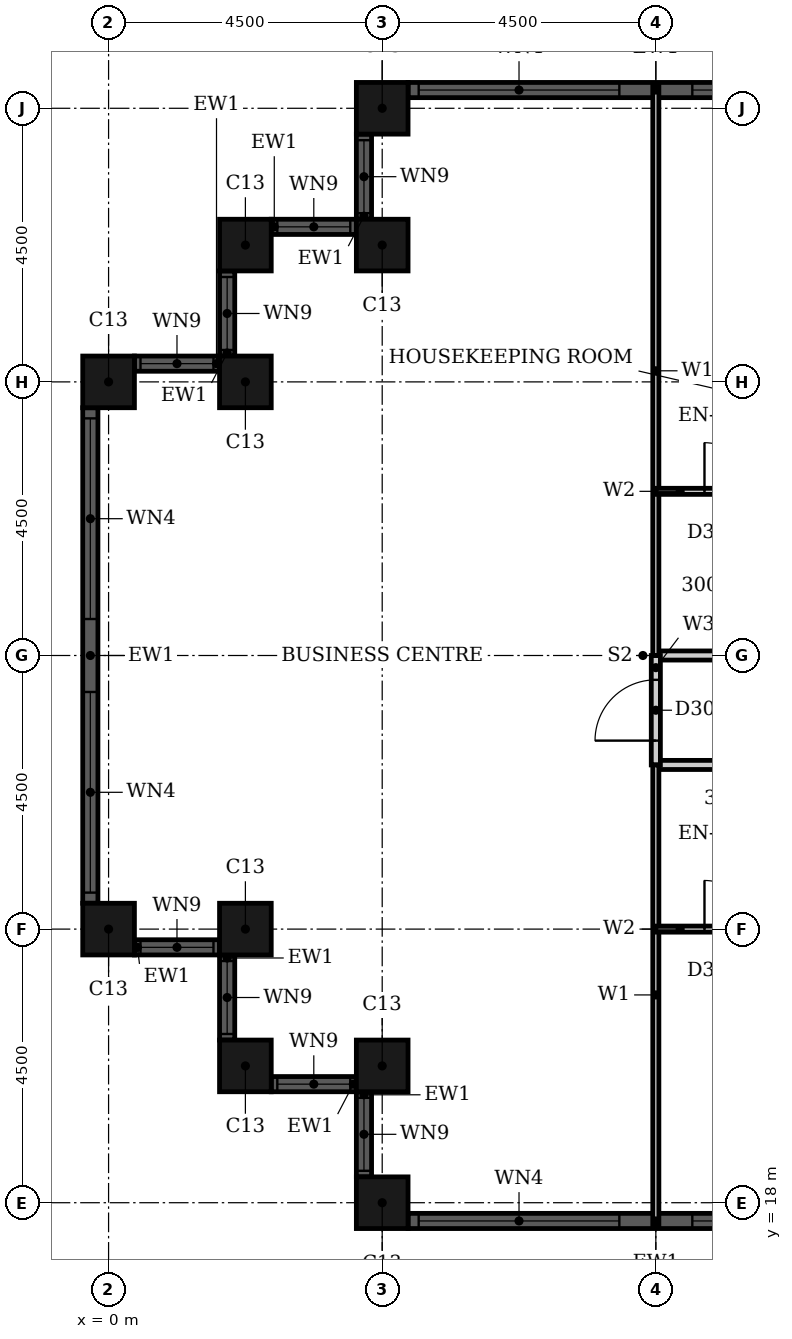
"""IFC4 building model, lengths in metres.
Left out: names, types, materials, properties, quantities, classifications, styles, units other than length and angle.
Written with IfcOpenShell. Run it as: python <this file> out.ifc"""

import sys

from ifc_helpers import new_model, si_unit, direction, frame, frame_2d, origin, origin_2d, place, context, subcontext, project, spatial, rectangle, hollow_rectangle, extrude, element, fill, save


model = new_model("IFC4")
c1 = context("Model", 3, precision=1e-05, world=origin(), true_north=direction((0.0, 1.0)))
c2 = subcontext(c1, "Body", "Model", "MODEL_VIEW")
j1 = project(units=[si_unit("LENGTHUNIT", "METRE"), si_unit("PLANEANGLEUNIT", "RADIAN")], contexts=[c1])
p1 = place(None, origin())
s1 = spatial("IfcSite", under=j1, at=p1, CompositionType="ELEMENT")
p2 = place(p1, origin())
s2 = spatial("IfcBuilding", under=s1, at=p2, CompositionType="ELEMENT")
p3 = place(p2, frame((0.0, 0.0, 122.4)))
s3 = spatial("IfcBuildingStorey", under=s2, at=p3, CompositionType="ELEMENT", Elevation=122.4)
for number, where, z_axis, x_axis in (
    (1, (4.5, 36.0, 0.0), (0.0, 0.0, 1.0), (1.0, 0.0, 0.0)),
    (2, (4.5, 33.75, 0.0), (0.0, 0.0, 1.0), (1.0, 0.0, 0.0)),
    (3, (2.25, 33.75, 0.0), (0.0, 0.0, 1.0), (1.0, 0.0, 0.0)),
    (4, (2.25, 31.5, 0.0), (0.0, 0.0, 1.0), (1.0, 0.0, 0.0)),
    (5, (0.0, 31.5, 0.0), (0.0, 0.0, 1.0), (1.0, 0.0, 0.0)),
    (6, (0.0, 22.5, 0.0), (0.0, 0.0, 1.0), (1.0, 0.0, 0.0)),
    (7, (2.25, 22.5, 0.0), (0.0, 0.0, 1.0), (1.0, 0.0, 0.0)),
    (8, (2.25, 20.25, 0.0), (0.0, 0.0, 1.0), (1.0, 0.0, 0.0)),
    (9, (4.5, 20.25, 0.0), (0.0, 0.0, 1.0), (1.0, 0.0, 0.0)),
    (10, (4.5, 18.0, 0.0), (0.0, 0.0, 1.0), (1.0, 0.0, 0.0)),
):
    element("IfcColumn", number, at=place(p3, frame(where, z_axis=z_axis, x_axis=x_axis)), inside=s3, PredefinedType="COLUMN", context=c2, shape_type="SweptSolid", body=[
        extrude(hollow_rectangle(XDim=0.85, YDim=0.85, WallThickness=0.026, at=origin_2d()), origin(), (0.0, 0.0, 1.0), 3.6),
    ])
p4 = place(p3, frame((13.075, 36.3, 0.0), z_axis=(0.0, 0.0, 1.0), x_axis=(-1.0, 0.0, 0.0)))
e11 = element("IfcWall", 11, at=p4, inside=s3, PredefinedType="SOLIDWALL", context=c2, shape_type="SweptSolid", body=[
    extrude(rectangle(XDim=8.15, YDim=0.25, at=frame_2d((4.075, 0.0))), origin(), (0.0, 0.0, 1.0), 3.6),
])
p5 = place(p4, frame((0.175, 0.0, 0.9)))
e12 = element("IfcOpeningElement", 12, at=p5, cuts=e11, PredefinedType="OPENING", context=c2, shape_type="SweptSolid", body=[
    extrude(rectangle(XDim=3.3, YDim=2.08, at=frame_2d((1.65, 1.04))), frame((0.0, 0.135, 0.0), z_axis=(0.0, -1.0, 0.0), x_axis=(1.0, 0.0, 0.0)), (0.0, 0.0, 1.0), 0.27),
])
p6 = place(p4, frame((4.675, 0.0, 0.9)))
e13 = element("IfcOpeningElement", 13, at=p6, cuts=e11, PredefinedType="OPENING", context=c2, shape_type="SweptSolid", body=[
    extrude(rectangle(XDim=3.3, YDim=2.08, at=frame_2d((1.65, 1.04))), frame((0.0, 0.135, 0.0), z_axis=(0.0, -1.0, 0.0), x_axis=(1.0, 0.0, 0.0)), (0.0, 0.0, 1.0), 0.27),
])
p7 = place(p3, frame((4.2, 35.575, 0.0), z_axis=(0.0, 0.0, 1.0), x_axis=(0.0, -1.0, 0.0)))
e14 = element("IfcWall", 14, at=p7, inside=s3, PredefinedType="SOLIDWALL", context=c2, shape_type="SweptSolid", body=[
    extrude(rectangle(XDim=1.4, YDim=0.25, at=frame_2d((0.7, 0.0))), origin(), (0.0, 0.0, 1.0), 3.6),
])
p8 = place(p7, frame((0.1, 0.0, 0.9)))
e15 = element("IfcOpeningElement", 15, at=p8, cuts=e14, PredefinedType="OPENING", context=c2, shape_type="SweptSolid", body=[
    extrude(rectangle(XDim=1.2, YDim=2.08, at=frame_2d((0.6, 1.04))), frame((0.0, 0.135, 0.0), z_axis=(0.0, -1.0, 0.0), x_axis=(1.0, 0.0, 0.0)), (0.0, 0.0, 1.0), 0.27),
])
p9 = place(p3, frame((4.075, 34.05, 0.0), z_axis=(0.0, 0.0, 1.0), x_axis=(-1.0, 0.0, 0.0)))
e16 = element("IfcWall", 16, at=p9, inside=s3, PredefinedType="SOLIDWALL", context=c2, shape_type="SweptSolid", body=[
    extrude(rectangle(XDim=1.4, YDim=0.25, at=frame_2d((0.7, 0.0))), origin(), (0.0, 0.0, 1.0), 3.6),
])
p10 = place(p9, frame((0.1, 0.0, 0.9)))
e17 = element("IfcOpeningElement", 17, at=p10, cuts=e16, PredefinedType="OPENING", context=c2, shape_type="SweptSolid", body=[
    extrude(rectangle(XDim=1.2, YDim=2.08, at=frame_2d((0.6, 1.04))), frame((0.0, 0.135, 0.0), z_axis=(0.0, -1.0, 0.0), x_axis=(1.0, 0.0, 0.0)), (0.0, 0.0, 1.0), 0.27),
])
p11 = place(p3, frame((1.95, 33.325, 0.0), z_axis=(0.0, 0.0, 1.0), x_axis=(0.0, -1.0, 0.0)))
e18 = element("IfcWall", 18, at=p11, inside=s3, PredefinedType="SOLIDWALL", context=c2, shape_type="SweptSolid", body=[
    extrude(rectangle(XDim=1.4, YDim=0.25, at=frame_2d((0.7, 0.0))), origin(), (0.0, 0.0, 1.0), 3.6),
])
p12 = place(p11, frame((0.1, 0.0, 0.9)))
e19 = element("IfcOpeningElement", 19, at=p12, cuts=e18, PredefinedType="OPENING", context=c2, shape_type="SweptSolid", body=[
    extrude(rectangle(XDim=1.2, YDim=2.08, at=frame_2d((0.6, 1.04))), frame((0.0, 0.135, 0.0), z_axis=(0.0, -1.0, 0.0), x_axis=(1.0, 0.0, 0.0)), (0.0, 0.0, 1.0), 0.27),
])
p13 = place(p3, frame((1.825, 31.8, 0.0), z_axis=(0.0, 0.0, 1.0), x_axis=(-1.0, 0.0, 0.0)))
e20 = element("IfcWall", 20, at=p13, inside=s3, PredefinedType="SOLIDWALL", context=c2, shape_type="SweptSolid", body=[
    extrude(rectangle(XDim=1.4, YDim=0.25, at=frame_2d((0.7, 0.0))), origin(), (0.0, 0.0, 1.0), 3.6),
])
p14 = place(p13, frame((0.1, 0.0, 0.9)))
e21 = element("IfcOpeningElement", 21, at=p14, cuts=e20, PredefinedType="OPENING", context=c2, shape_type="SweptSolid", body=[
    extrude(rectangle(XDim=1.2, YDim=2.08, at=frame_2d((0.6, 1.04))), frame((0.0, 0.135, 0.0), z_axis=(0.0, -1.0, 0.0), x_axis=(1.0, 0.0, 0.0)), (0.0, 0.0, 1.0), 0.27),
])
p15 = place(p3, frame((-0.3, 31.075, 0.0), z_axis=(0.0, 0.0, 1.0), x_axis=(0.0, -1.0, 0.0)))
e22 = element("IfcWall", 22, at=p15, inside=s3, PredefinedType="SOLIDWALL", context=c2, shape_type="SweptSolid", body=[
    extrude(rectangle(XDim=8.15, YDim=0.25, at=frame_2d((4.075, 0.0))), origin(), (0.0, 0.0, 1.0), 3.6),
])
p16 = place(p15, frame((0.175, 0.0, 0.9)))
e23 = element("IfcOpeningElement", 23, at=p16, cuts=e22, PredefinedType="OPENING", context=c2, shape_type="SweptSolid", body=[
    extrude(rectangle(XDim=3.3, YDim=2.08, at=frame_2d((1.65, 1.04))), frame((0.0, 0.135, 0.0), z_axis=(0.0, -1.0, 0.0), x_axis=(1.0, 0.0, 0.0)), (0.0, 0.0, 1.0), 0.27),
])
p17 = place(p15, frame((4.675, 0.0, 0.9)))
e24 = element("IfcOpeningElement", 24, at=p17, cuts=e22, PredefinedType="OPENING", context=c2, shape_type="SweptSolid", body=[
    extrude(rectangle(XDim=3.3, YDim=2.08, at=frame_2d((1.65, 1.04))), frame((0.0, 0.135, 0.0), z_axis=(0.0, -1.0, 0.0), x_axis=(1.0, 0.0, 0.0)), (0.0, 0.0, 1.0), 0.27),
])
p18 = place(p3, frame((0.425, 22.2, 0.0), z_axis=(0.0, 0.0, 1.0), x_axis=(1.0, 0.0, 0.0)))
e25 = element("IfcWall", 25, at=p18, inside=s3, PredefinedType="SOLIDWALL", context=c2, shape_type="SweptSolid", body=[
    extrude(rectangle(XDim=1.4, YDim=0.25, at=frame_2d((0.7, 0.0))), origin(), (0.0, 0.0, 1.0), 3.6),
])
p19 = place(p18, frame((0.1, 0.0, 0.9)))
e26 = element("IfcOpeningElement", 26, at=p19, cuts=e25, PredefinedType="OPENING", context=c2, shape_type="SweptSolid", body=[
    extrude(rectangle(XDim=1.2, YDim=2.08, at=frame_2d((0.6, 1.04))), frame((0.0, 0.135, 0.0), z_axis=(0.0, -1.0, 0.0), x_axis=(1.0, 0.0, 0.0)), (0.0, 0.0, 1.0), 0.27),
])
p20 = place(p3, frame((1.95, 22.075, 0.0), z_axis=(0.0, 0.0, 1.0), x_axis=(0.0, -1.0, 0.0)))
e27 = element("IfcWall", 27, at=p20, inside=s3, PredefinedType="SOLIDWALL", context=c2, shape_type="SweptSolid", body=[
    extrude(rectangle(XDim=1.4, YDim=0.25, at=frame_2d((0.7, 0.0))), origin(), (0.0, 0.0, 1.0), 3.6),
])
p21 = place(p20, frame((0.1, 0.0, 0.9)))
e28 = element("IfcOpeningElement", 28, at=p21, cuts=e27, PredefinedType="OPENING", context=c2, shape_type="SweptSolid", body=[
    extrude(rectangle(XDim=1.2, YDim=2.08, at=frame_2d((0.6, 1.04))), frame((0.0, 0.135, 0.0), z_axis=(0.0, -1.0, 0.0), x_axis=(1.0, 0.0, 0.0)), (0.0, 0.0, 1.0), 0.27),
])
p22 = place(p3, frame((2.675, 19.95, 0.0), z_axis=(0.0, 0.0, 1.0), x_axis=(1.0, 0.0, 0.0)))
e29 = element("IfcWall", 29, at=p22, inside=s3, PredefinedType="SOLIDWALL", context=c2, shape_type="SweptSolid", body=[
    extrude(rectangle(XDim=1.4, YDim=0.25, at=frame_2d((0.7, 0.0))), origin(), (0.0, 0.0, 1.0), 3.6),
])
p23 = place(p22, frame((0.1, 0.0, 0.9)))
e30 = element("IfcOpeningElement", 30, at=p23, cuts=e29, PredefinedType="OPENING", context=c2, shape_type="SweptSolid", body=[
    extrude(rectangle(XDim=1.2, YDim=2.08, at=frame_2d((0.6, 1.04))), frame((0.0, 0.135, 0.0), z_axis=(0.0, -1.0, 0.0), x_axis=(1.0, 0.0, 0.0)), (0.0, 0.0, 1.0), 0.27),
])
p24 = place(p3, frame((4.2, 19.825, 0.0), z_axis=(0.0, 0.0, 1.0), x_axis=(0.0, -1.0, 0.0)))
e31 = element("IfcWall", 31, at=p24, inside=s3, PredefinedType="SOLIDWALL", context=c2, shape_type="SweptSolid", body=[
    extrude(rectangle(XDim=1.4, YDim=0.25, at=frame_2d((0.7, 0.0))), origin(), (0.0, 0.0, 1.0), 3.6),
])
p25 = place(p24, frame((0.1, 0.0, 0.9)))
e32 = element("IfcOpeningElement", 32, at=p25, cuts=e31, PredefinedType="OPENING", context=c2, shape_type="SweptSolid", body=[
    extrude(rectangle(XDim=1.2, YDim=2.08, at=frame_2d((0.6, 1.04))), frame((0.0, 0.135, 0.0), z_axis=(0.0, -1.0, 0.0), x_axis=(1.0, 0.0, 0.0)), (0.0, 0.0, 1.0), 0.27),
])
p26 = place(p3, frame((4.925, 17.7, 0.0), z_axis=(0.0, 0.0, 1.0), x_axis=(1.0, 0.0, 0.0)))
e33 = element("IfcWall", 33, at=p26, inside=s3, PredefinedType="SOLIDWALL", context=c2, shape_type="SweptSolid", body=[
    extrude(rectangle(XDim=8.15, YDim=0.25, at=frame_2d((4.075, 0.0))), origin(), (0.0, 0.0, 1.0), 3.6),
])
p27 = place(p26, frame((0.175, 0.0, 0.9)))
e34 = element("IfcOpeningElement", 34, at=p27, cuts=e33, PredefinedType="OPENING", context=c2, shape_type="SweptSolid", body=[
    extrude(rectangle(XDim=3.3, YDim=2.08, at=frame_2d((1.65, 1.04))), frame((0.0, 0.135, 0.0), z_axis=(0.0, -1.0, 0.0), x_axis=(1.0, 0.0, 0.0)), (0.0, 0.0, 1.0), 0.27),
])
p28 = place(p26, frame((4.675, 0.0, 0.9)))
e35 = element("IfcOpeningElement", 35, at=p28, cuts=e33, PredefinedType="OPENING", context=c2, shape_type="SweptSolid", body=[
    extrude(rectangle(XDim=3.3, YDim=2.08, at=frame_2d((1.65, 1.04))), frame((0.0, 0.135, 0.0), z_axis=(0.0, -1.0, 0.0), x_axis=(1.0, 0.0, 0.0)), (0.0, 0.0, 1.0), 0.27),
])
p29 = place(p3, frame((9.0, 25.2, 0.0), z_axis=(0.0, 0.0, 1.0), x_axis=(1.0, 0.0, 0.0)))
e36 = element("IfcWall", 36, at=p29, inside=s3, PredefinedType="PARTITIONING", context=c2, shape_type="SweptSolid", body=[
    extrude(rectangle(XDim=7.2, YDim=0.15, at=frame_2d((3.6, 0.0))), origin(), (0.0, 0.0, 1.0), 3.3),
])
p30 = place(p29, frame((2.95, 0.0, 0.0)))
e37 = element("IfcOpeningElement", 37, at=p30, cuts=e36, PredefinedType="OPENING", context=c2, shape_type="SweptSolid", body=[
    extrude(rectangle(XDim=1.0, YDim=2.1, at=frame_2d((0.5, 1.05))), frame((0.0, 0.085, 0.0), z_axis=(0.0, -1.0, 0.0), x_axis=(1.0, 0.0, 0.0)), (0.0, 0.0, 1.0), 0.17),
])
p31 = place(p3, frame((9.0, 27.0, 0.0), z_axis=(0.0, 0.0, 1.0), x_axis=(1.0, 0.0, 0.0)))
e38 = element("IfcWall", 38, at=p31, inside=s3, PredefinedType="PARTITIONING", context=c2, shape_type="SweptSolid", body=[
    extrude(rectangle(XDim=7.2, YDim=0.15, at=frame_2d((3.6, 0.0))), origin(), (0.0, 0.0, 1.0), 2.58),
])
p32 = place(p31, frame((2.95, 0.0, 0.0)))
e39 = element("IfcOpeningElement", 39, at=p32, cuts=e38, PredefinedType="OPENING", context=c2, shape_type="SweptSolid", body=[
    extrude(rectangle(XDim=1.0, YDim=2.1, at=frame_2d((0.5, 1.05))), frame((0.0, 0.085, 0.0), z_axis=(0.0, -1.0, 0.0), x_axis=(1.0, 0.0, 0.0)), (0.0, 0.0, 1.0), 0.17),
])
p33 = place(p3, frame((9.0, 25.2, 0.0), z_axis=(0.0, 0.0, 1.0), x_axis=(0.0, 1.0, 0.0)))
e40 = element("IfcWall", 40, at=p33, inside=s3, PredefinedType="PARTITIONING", context=c2, shape_type="SweptSolid", body=[
    extrude(rectangle(XDim=1.8, YDim=0.15, at=frame_2d((0.9, 0.0))), origin(), (0.0, 0.0, 1.0), 3.3),
])
p34 = place(p33, frame((0.4, 0.0, 0.0)))
e41 = element("IfcOpeningElement", 41, at=p34, cuts=e40, PredefinedType="OPENING", context=c2, shape_type="SweptSolid", body=[
    extrude(rectangle(XDim=1.0, YDim=2.1, at=frame_2d((0.5, 1.05))), frame((0.0, 0.085, 0.0), z_axis=(0.0, -1.0, 0.0), x_axis=(1.0, 0.0, 0.0)), (0.0, 0.0, 1.0), 0.17),
])
p35 = place(p3, frame((9.0, 27.0, 0.0), z_axis=(0.0, 0.0, 1.0), x_axis=(0.0, 1.0, 0.0)))
e42 = element("IfcWall", 42, at=p35, inside=s3, PredefinedType="PARTITIONING", context=c2, shape_type="SweptSolid", body=[
    extrude(rectangle(XDim=9.365, YDim=0.1, at=frame_2d((4.683, 0.0))), origin(), (0.0, 0.0, 1.0), 3.3),
])
p36 = place(p3, frame((9.0, 17.635, 0.0), z_axis=(0.0, 0.0, 1.0), x_axis=(0.0, 1.0, 0.0)))
e43 = element("IfcWall", 43, at=p36, inside=s3, PredefinedType="PARTITIONING", context=c2, shape_type="SweptSolid", body=[
    extrude(rectangle(XDim=7.565, YDim=0.1, at=frame_2d((3.782, 0.0))), origin(), (0.0, 0.0, 1.0), 3.3),
])
p37 = place(p3, frame((9.0, 22.5, 0.0), z_axis=(0.0, 0.0, 1.0), x_axis=(1.0, 0.0, 0.0)))
e44 = element("IfcWall", 44, at=p37, inside=s3, PredefinedType="PARTITIONING", context=c2, shape_type="SweptSolid", body=[
    extrude(rectangle(XDim=2.4, YDim=0.1, at=frame_2d((1.2, 0.0))), origin(), (0.0, 0.0, 1.0), 2.58),
])
p38 = place(p37, frame((0.8, 0.0, 0.0)))
e45 = element("IfcOpeningElement", 45, at=p38, cuts=e44, PredefinedType="OPENING", context=c2, shape_type="SweptSolid", body=[
    extrude(rectangle(XDim=0.8, YDim=2.1, at=frame_2d((0.4, 1.05))), frame((0.0, 0.06, 0.0), z_axis=(0.0, -1.0, 0.0), x_axis=(1.0, 0.0, 0.0)), (0.0, 0.0, 1.0), 0.12),
])
p39 = place(p3, frame((9.0, 29.7, 0.0), z_axis=(0.0, 0.0, 1.0), x_axis=(1.0, 0.0, 0.0)))
e46 = element("IfcWall", 46, at=p39, inside=s3, PredefinedType="PARTITIONING", context=c2, shape_type="SweptSolid", body=[
    extrude(rectangle(XDim=2.4, YDim=0.1, at=frame_2d((1.2, 0.0))), origin(), (0.0, 0.0, 1.0), 3.3),
])
p40 = place(p39, frame((0.8, 0.0, 0.0)))
e47 = element("IfcOpeningElement", 47, at=p40, cuts=e46, PredefinedType="OPENING", context=c2, shape_type="SweptSolid", body=[
    extrude(rectangle(XDim=0.8, YDim=2.1, at=frame_2d((0.4, 1.05))), frame((0.0, 0.06, 0.0), z_axis=(0.0, -1.0, 0.0), x_axis=(1.0, 0.0, 0.0)), (0.0, 0.0, 1.0), 0.12),
])
p41 = place(p5, origin())
e48 = element("IfcWindow", 48, at=p41, inside=s3, PartitioningType="SINGLE_PANEL", PredefinedType="WINDOW", context=c2, shape_type="SweptSolid", body=[
    extrude(rectangle(XDim=3.3, YDim=2.08, at=frame_2d((1.65, 1.04))), frame((0.0, 0.03, 0.0), z_axis=(0.0, -1.0, 0.0), x_axis=(1.0, 0.0, 0.0)), (0.0, 0.0, 1.0), 0.06),
])
fill(e12, e48)
p42 = place(p6, origin())
e49 = element("IfcWindow", 49, at=p42, inside=s3, PartitioningType="SINGLE_PANEL", PredefinedType="WINDOW", context=c2, shape_type="SweptSolid", body=[
    extrude(rectangle(XDim=3.3, YDim=2.08, at=frame_2d((1.65, 1.04))), frame((0.0, 0.03, 0.0), z_axis=(0.0, -1.0, 0.0), x_axis=(1.0, 0.0, 0.0)), (0.0, 0.0, 1.0), 0.06),
])
fill(e13, e49)
p43 = place(p8, origin())
e50 = element("IfcWindow", 50, at=p43, inside=s3, PartitioningType="SINGLE_PANEL", PredefinedType="WINDOW", context=c2, shape_type="SweptSolid", body=[
    extrude(rectangle(XDim=1.2, YDim=2.08, at=frame_2d((0.6, 1.04))), frame((0.0, 0.03, 0.0), z_axis=(0.0, -1.0, 0.0), x_axis=(1.0, 0.0, 0.0)), (0.0, 0.0, 1.0), 0.06),
])
fill(e15, e50)
p44 = place(p10, origin())
e51 = element("IfcWindow", 51, at=p44, inside=s3, PartitioningType="SINGLE_PANEL", PredefinedType="WINDOW", context=c2, shape_type="SweptSolid", body=[
    extrude(rectangle(XDim=1.2, YDim=2.08, at=frame_2d((0.6, 1.04))), frame((0.0, 0.03, 0.0), z_axis=(0.0, -1.0, 0.0), x_axis=(1.0, 0.0, 0.0)), (0.0, 0.0, 1.0), 0.06),
])
fill(e17, e51)
p45 = place(p12, origin())
e52 = element("IfcWindow", 52, at=p45, inside=s3, PartitioningType="SINGLE_PANEL", PredefinedType="WINDOW", context=c2, shape_type="SweptSolid", body=[
    extrude(rectangle(XDim=1.2, YDim=2.08, at=frame_2d((0.6, 1.04))), frame((0.0, 0.03, 0.0), z_axis=(0.0, -1.0, 0.0), x_axis=(1.0, 0.0, 0.0)), (0.0, 0.0, 1.0), 0.06),
])
fill(e19, e52)
p46 = place(p14, origin())
e53 = element("IfcWindow", 53, at=p46, inside=s3, PartitioningType="SINGLE_PANEL", PredefinedType="WINDOW", context=c2, shape_type="SweptSolid", body=[
    extrude(rectangle(XDim=1.2, YDim=2.08, at=frame_2d((0.6, 1.04))), frame((0.0, 0.03, 0.0), z_axis=(0.0, -1.0, 0.0), x_axis=(1.0, 0.0, 0.0)), (0.0, 0.0, 1.0), 0.06),
])
fill(e21, e53)
p47 = place(p16, origin())
e54 = element("IfcWindow", 54, at=p47, inside=s3, PartitioningType="SINGLE_PANEL", PredefinedType="WINDOW", context=c2, shape_type="SweptSolid", body=[
    extrude(rectangle(XDim=3.3, YDim=2.08, at=frame_2d((1.65, 1.04))), frame((0.0, 0.03, 0.0), z_axis=(0.0, -1.0, 0.0), x_axis=(1.0, 0.0, 0.0)), (0.0, 0.0, 1.0), 0.06),
])
fill(e23, e54)
p48 = place(p17, origin())
e55 = element("IfcWindow", 55, at=p48, inside=s3, PartitioningType="SINGLE_PANEL", PredefinedType="WINDOW", context=c2, shape_type="SweptSolid", body=[
    extrude(rectangle(XDim=3.3, YDim=2.08, at=frame_2d((1.65, 1.04))), frame((0.0, 0.03, 0.0), z_axis=(0.0, -1.0, 0.0), x_axis=(1.0, 0.0, 0.0)), (0.0, 0.0, 1.0), 0.06),
])
fill(e24, e55)
p49 = place(p19, origin())
e56 = element("IfcWindow", 56, at=p49, inside=s3, PartitioningType="SINGLE_PANEL", PredefinedType="WINDOW", context=c2, shape_type="SweptSolid", body=[
    extrude(rectangle(XDim=1.2, YDim=2.08, at=frame_2d((0.6, 1.04))), frame((0.0, 0.03, 0.0), z_axis=(0.0, -1.0, 0.0), x_axis=(1.0, 0.0, 0.0)), (0.0, 0.0, 1.0), 0.06),
])
fill(e26, e56)
p50 = place(p21, origin())
e57 = element("IfcWindow", 57, at=p50, inside=s3, PartitioningType="SINGLE_PANEL", PredefinedType="WINDOW", context=c2, shape_type="SweptSolid", body=[
    extrude(rectangle(XDim=1.2, YDim=2.08, at=frame_2d((0.6, 1.04))), frame((0.0, 0.03, 0.0), z_axis=(0.0, -1.0, 0.0), x_axis=(1.0, 0.0, 0.0)), (0.0, 0.0, 1.0), 0.06),
])
fill(e28, e57)
p51 = place(p23, origin())
e58 = element("IfcWindow", 58, at=p51, inside=s3, PartitioningType="SINGLE_PANEL", PredefinedType="WINDOW", context=c2, shape_type="SweptSolid", body=[
    extrude(rectangle(XDim=1.2, YDim=2.08, at=frame_2d((0.6, 1.04))), frame((0.0, 0.03, 0.0), z_axis=(0.0, -1.0, 0.0), x_axis=(1.0, 0.0, 0.0)), (0.0, 0.0, 1.0), 0.06),
])
fill(e30, e58)
p52 = place(p25, origin())
e59 = element("IfcWindow", 59, at=p52, inside=s3, PartitioningType="SINGLE_PANEL", PredefinedType="WINDOW", context=c2, shape_type="SweptSolid", body=[
    extrude(rectangle(XDim=1.2, YDim=2.08, at=frame_2d((0.6, 1.04))), frame((0.0, 0.03, 0.0), z_axis=(0.0, -1.0, 0.0), x_axis=(1.0, 0.0, 0.0)), (0.0, 0.0, 1.0), 0.06),
])
fill(e32, e59)
p53 = place(p27, origin())
e60 = element("IfcWindow", 60, at=p53, inside=s3, PartitioningType="SINGLE_PANEL", PredefinedType="WINDOW", context=c2, shape_type="SweptSolid", body=[
    extrude(rectangle(XDim=3.3, YDim=2.08, at=frame_2d((1.65, 1.04))), frame((0.0, 0.03, 0.0), z_axis=(0.0, -1.0, 0.0), x_axis=(1.0, 0.0, 0.0)), (0.0, 0.0, 1.0), 0.06),
])
fill(e34, e60)
p54 = place(p28, origin())
e61 = element("IfcWindow", 61, at=p54, inside=s3, PartitioningType="SINGLE_PANEL", PredefinedType="WINDOW", context=c2, shape_type="SweptSolid", body=[
    extrude(rectangle(XDim=3.3, YDim=2.08, at=frame_2d((1.65, 1.04))), frame((0.0, 0.03, 0.0), z_axis=(0.0, -1.0, 0.0), x_axis=(1.0, 0.0, 0.0)), (0.0, 0.0, 1.0), 0.06),
])
fill(e35, e61)
p55 = place(p38, origin())
e62 = element("IfcDoor", 62, at=p55, inside=s3, OperationType="SINGLE_SWING_RIGHT", PredefinedType="DOOR", context=c2, shape_type="SweptSolid", body=[
    extrude(rectangle(XDim=0.8, YDim=2.1, at=frame_2d((0.4, 1.05))), frame((0.0, 0.025, 0.0), z_axis=(0.0, -1.0, 0.0), x_axis=(1.0, 0.0, 0.0)), (0.0, 0.0, 1.0), 0.05),
])
fill(e45, e62)
p56 = place(p40, origin())
e63 = element("IfcDoor", 63, at=p56, inside=s3, OperationType="SINGLE_SWING_RIGHT", PredefinedType="DOOR", context=c2, shape_type="SweptSolid", body=[
    extrude(rectangle(XDim=0.8, YDim=2.1, at=frame_2d((0.4, 1.05))), frame((0.0, 0.025, 0.0), z_axis=(0.0, -1.0, 0.0), x_axis=(1.0, 0.0, 0.0)), (0.0, 0.0, 1.0), 0.05),
])
fill(e47, e63)
p57 = place(p34, origin())
e64 = element("IfcDoor", 64, at=p57, inside=s3, OperationType="SINGLE_SWING_RIGHT", PredefinedType="DOOR", context=c2, shape_type="SweptSolid", body=[
    extrude(rectangle(XDim=1.0, YDim=2.1, at=frame_2d((0.5, 1.05))), frame((0.0, 0.025, 0.0), z_axis=(0.0, -1.0, 0.0), x_axis=(1.0, 0.0, 0.0)), (0.0, 0.0, 1.0), 0.05),
])
fill(e41, e64)
save(model, sys.argv[1])
